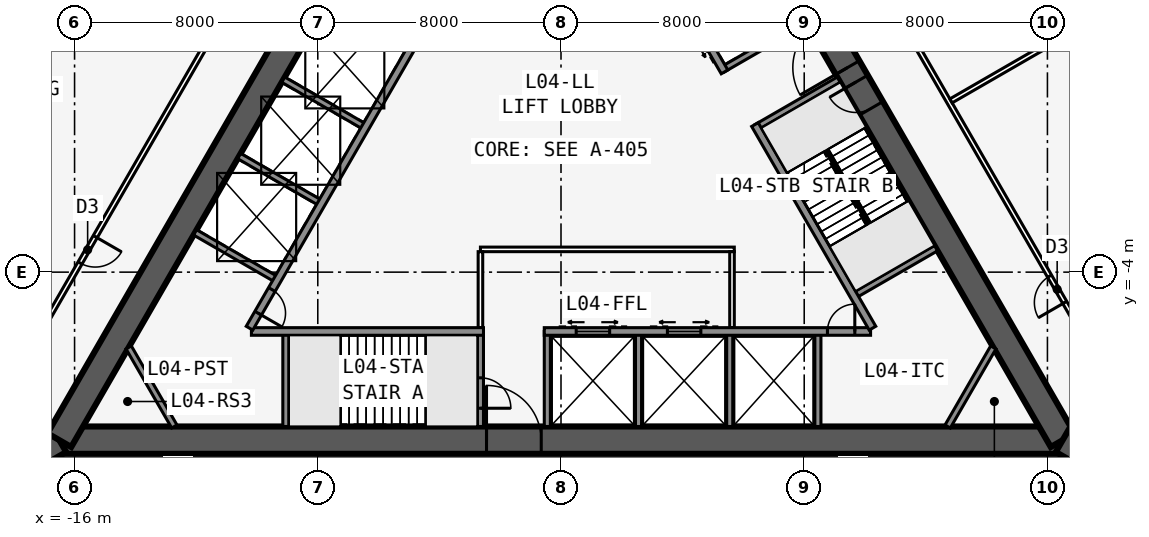
"""IFC4 building model, lengths in metres.
Left out: names, types, materials, properties, quantities, classifications, styles, units other than length and angle.
Written with IfcOpenShell. Run it as: python <this file> out.ifc"""

import sys

from ifc_helpers import new_model, si_unit, direction, frame, frame_2d, origin, place, context, subcontext, project, spatial, rectangle, extrude, element, fill, save


model = new_model("IFC4")
c1 = context("Model", 3, precision=1e-05, world=origin(), true_north=direction((0.0, 1.0)))
c2 = subcontext(c1, "Body", "Model", "MODEL_VIEW")
j1 = project(units=[si_unit("LENGTHUNIT", "METRE"), si_unit("PLANEANGLEUNIT", "RADIAN")], contexts=[c1])
p1 = place(None, origin())
s1 = spatial("IfcSite", under=j1, at=p1, CompositionType="ELEMENT")
p2 = place(p1, origin())
s2 = spatial("IfcBuilding", under=s1, at=p2, CompositionType="ELEMENT")
p3 = place(p2, frame((0.0, 0.0, 22.5)))
s3 = spatial("IfcBuildingStorey", under=s2, at=p3, CompositionType="ELEMENT", Elevation=22.5)
p4 = place(p3, frame((-16.5, -9.526, 0.0), z_axis=(0.0, 0.0, 1.0), x_axis=(1.0, 0.0, 0.0)))
e1 = element("IfcWall", 1, at=p4, inside=s3, PredefinedType="SHEAR", context=c2, shape_type="SweptSolid", body=[
    extrude(rectangle(XDim=33.0, YDim=0.9, at=frame_2d((16.5, 0.0))), origin(), (0.0, 0.0, 1.0), 6.0),
])
p5 = place(p4, frame((14.05, 0.0, 0.0)))
e2 = element("IfcOpeningElement", 2, at=p5, cuts=e1, PredefinedType="OPENING", context=c2, shape_type="SweptSolid", body=[
    extrude(rectangle(XDim=1.8, YDim=2.13, at=frame_2d((0.9, 1.065))), frame((0.0, 0.46, 0.0), z_axis=(0.0, -1.0, 0.0), x_axis=(1.0, 0.0, 0.0)), (0.0, 0.0, 1.0), 0.92),
])
p6 = place(p3, frame((-10.183, -5.951, 0.0), z_axis=(0.0, 0.0, 1.0), x_axis=(1.0, 0.0, 0.0)))
e3 = element("IfcWall", 3, at=p6, inside=s3, PredefinedType="SOLIDWALL", context=c2, shape_type="SweptSolid", body=[
    extrude(rectangle(XDim=7.633, YDim=0.25, at=frame_2d((3.816, 0.0))), origin(), (0.0, 0.0, 1.0), 5.835),
])
p7 = place(p3, frame((-0.55, -5.951, 0.0), z_axis=(0.0, 0.0, 1.0), x_axis=(1.0, 0.0, 0.0)))
e4 = element("IfcWall", 4, at=p7, inside=s3, PredefinedType="SOLIDWALL", context=c2, shape_type="SweptSolid", body=[
    extrude(rectangle(XDim=10.733, YDim=0.25, at=frame_2d((5.366, 0.0))), origin(), (0.0, 0.0, 1.0), 5.835),
])
p8 = place(p7, frame((9.314, 0.0, 0.0)))
e5 = element("IfcOpeningElement", 5, at=p8, cuts=e4, PredefinedType="OPENING", context=c2, shape_type="SweptSolid", body=[
    extrude(rectangle(XDim=0.9, YDim=2.13, at=frame_2d((0.45, 1.065))), frame((0.0, 0.135, 0.0), z_axis=(0.0, -1.0, 0.0), x_axis=(1.0, 0.0, 0.0)), (0.0, 0.0, 1.0), 0.27),
])
p9 = place(p7, frame((1.05, 0.0, 0.0)))
e6 = element("IfcOpeningElement", 6, at=p9, cuts=e4, PredefinedType="OPENING", context=c2, shape_type="SweptSolid", body=[
    extrude(rectangle(XDim=1.1, YDim=2.13, at=frame_2d((0.55, 1.065))), frame((0.0, 0.135, 0.0), z_axis=(0.0, -1.0, 0.0), x_axis=(1.0, 0.0, 0.0)), (0.0, 0.0, 1.0), 0.27),
])
p10 = place(p7, frame((4.05, 0.0, 0.0)))
e7 = element("IfcOpeningElement", 7, at=p10, cuts=e4, PredefinedType="OPENING", context=c2, shape_type="SweptSolid", body=[
    extrude(rectangle(XDim=1.1, YDim=2.13, at=frame_2d((0.55, 1.065))), frame((0.0, 0.135, 0.0), z_axis=(0.0, -1.0, 0.0), x_axis=(1.0, 0.0, 0.0)), (0.0, 0.0, 1.0), 0.27),
])
p11 = place(p3, frame((-9.05, -5.951, 0.0), z_axis=(0.0, 0.0, 1.0), x_axis=(0.0, -1.0, 0.0)))
e8 = element("IfcWall", 8, at=p11, inside=s3, PredefinedType="SOLIDWALL", context=c2, shape_type="SweptSolid", body=[
    extrude(rectangle(XDim=3.125, YDim=0.2, at=frame_2d((1.562, 0.0))), origin(), (0.0, 0.0, 1.0), 5.835),
])
p12 = place(p3, frame((-2.65, -5.951, 0.0), z_axis=(0.0, 0.0, 1.0), x_axis=(0.0, -1.0, 0.0)))
e9 = element("IfcWall", 9, at=p12, inside=s3, PredefinedType="SOLIDWALL", context=c2, shape_type="SweptSolid", body=[
    extrude(rectangle(XDim=3.125, YDim=0.2, at=frame_2d((1.562, 0.0))), origin(), (0.0, 0.0, 1.0), 5.835),
])
p13 = place(p12, frame((1.525, 0.0, 0.0)))
e10 = element("IfcOpeningElement", 10, at=p13, cuts=e9, PredefinedType="OPENING", context=c2, shape_type="SweptSolid", body=[
    extrude(rectangle(XDim=1.0, YDim=2.13, at=frame_2d((0.5, 1.065))), frame((0.0, 0.11, 0.0), z_axis=(0.0, -1.0, 0.0), x_axis=(1.0, 0.0, 0.0)), (0.0, 0.0, 1.0), 0.22),
])
for number, where, z_axis, x_axis in (
    (11, (-0.45, -5.951, 0.0), (0.0, 0.0, 1.0), (0.0, -1.0, 0.0)),
    (12, (2.55, -5.951, 0.0), (0.0, 0.0, 1.0), (0.0, -1.0, 0.0)),
    (13, (5.55, -5.951, 0.0), (0.0, 0.0, 1.0), (0.0, -1.0, 0.0)),
    (14, (8.45, -5.951, 0.0), (0.0, 0.0, 1.0), (0.0, -1.0, 0.0)),
):
    element("IfcWall", number, at=place(p3, frame(where, z_axis=z_axis, x_axis=x_axis)), inside=s3, PredefinedType="SOLIDWALL", context=c2, shape_type="SweptSolid", body=[
        extrude(rectangle(XDim=3.125, YDim=0.2, at=frame_2d((1.562, 0.0))), origin(), (0.0, 0.0, 1.0), 5.835),
    ])
p14 = place(p3, frame((16.5, -9.526, 0.0), z_axis=(0.0, 0.0, 1.0), x_axis=(-0.499999749417, 0.866025548458, 0.0)))
e15 = element("IfcWall", 15, at=p14, inside=s3, PredefinedType="SHEAR", context=c2, shape_type="SweptSolid", body=[
    extrude(rectangle(XDim=33.0, YDim=0.9, at=frame_2d((16.5, 0.0))), origin(), (0.0, 0.0, 1.0), 6.0),
])
p15 = place(p14, frame((14.15, 0.0, 0.0)))
e16 = element("IfcOpeningElement", 16, at=p15, cuts=e15, PredefinedType="OPENING", context=c2, shape_type="SweptSolid", body=[
    extrude(rectangle(XDim=1.8, YDim=2.13, at=frame_2d((0.9, 1.065))), frame((0.0, 0.46, 0.0), z_axis=(0.0, -1.0, 0.0), x_axis=(1.0, 0.0, 0.0)), (0.0, 0.0, 1.0), 0.92),
])
p16 = place(p14, frame((12.6, 0.0, 0.0)))
e17 = element("IfcOpeningElement", 17, at=p16, cuts=e15, PredefinedType="OPENING", context=c2, shape_type="SweptSolid", body=[
    extrude(rectangle(XDim=1.0, YDim=2.13, at=frame_2d((0.5, 1.065))), frame((0.0, 0.46, 0.0), z_axis=(0.0, -1.0, 0.0), x_axis=(1.0, 0.0, 0.0)), (0.0, 0.0, 1.0), 0.92),
])
p17 = place(p3, frame((10.245, -5.843, 0.0), z_axis=(0.0, 0.0, 1.0), x_axis=(-0.499993009313, 0.866029439822, 0.0)))
e18 = element("IfcWall", 18, at=p17, inside=s3, PredefinedType="SOLIDWALL", context=c2, shape_type="SweptSolid", body=[
    extrude(rectangle(XDim=7.733, YDim=0.25, at=frame_2d((3.866, 0.0))), origin(), (0.0, 0.0, 1.0), 5.835),
])
p18 = place(p3, frame((5.379, 2.586, 0.0), z_axis=(0.0, 0.0, 1.0), x_axis=(-0.500001375892, 0.866024609411, 0.0)))
e19 = element("IfcWall", 19, at=p18, inside=s3, PredefinedType="SOLIDWALL", context=c2, shape_type="SweptSolid", body=[
    extrude(rectangle(XDim=10.633, YDim=0.25, at=frame_2d((5.316, 0.0))), origin(), (0.0, 0.0, 1.0), 5.835),
])
p19 = place(p18, frame((9.164, 0.0, 0.0)))
e20 = element("IfcOpeningElement", 20, at=p19, cuts=e19, PredefinedType="OPENING", context=c2, shape_type="SweptSolid", body=[
    extrude(rectangle(XDim=0.9, YDim=2.13, at=frame_2d((0.45, 1.065))), frame((0.0, 0.135, 0.0), z_axis=(0.0, -1.0, 0.0), x_axis=(1.0, 0.0, 0.0)), (0.0, 0.0, 1.0), 0.27),
])
p20 = place(p18, frame((1.0, 0.0, 0.0)))
e21 = element("IfcOpeningElement", 21, at=p20, cuts=e19, PredefinedType="OPENING", context=c2, shape_type="SweptSolid", body=[
    extrude(rectangle(XDim=1.1, YDim=2.13, at=frame_2d((0.55, 1.065))), frame((0.0, 0.135, 0.0), z_axis=(0.0, -1.0, 0.0), x_axis=(1.0, 0.0, 0.0)), (0.0, 0.0, 1.0), 0.27),
])
p21 = place(p18, frame((3.9, 0.0, 0.0)))
e22 = element("IfcOpeningElement", 22, at=p21, cuts=e19, PredefinedType="OPENING", context=c2, shape_type="SweptSolid", body=[
    extrude(rectangle(XDim=1.1, YDim=2.13, at=frame_2d((0.55, 1.065))), frame((0.0, 0.135, 0.0), z_axis=(0.0, -1.0, 0.0), x_axis=(1.0, 0.0, 0.0)), (0.0, 0.0, 1.0), 0.27),
])
p22 = place(p18, frame((6.8, 0.0, 0.0)))
e23 = element("IfcOpeningElement", 23, at=p22, cuts=e19, PredefinedType="OPENING", context=c2, shape_type="SweptSolid", body=[
    extrude(rectangle(XDim=1.1, YDim=2.13, at=frame_2d((0.55, 1.065))), frame((0.0, 0.135, 0.0), z_axis=(0.0, -1.0, 0.0), x_axis=(1.0, 0.0, 0.0)), (0.0, 0.0, 1.0), 0.27),
])
for number, where, z_axis, x_axis in (
    (24, (9.629, -4.775, 0.0), (0.0, 0.0, 1.0), (0.866, 0.5, 0.0)),
    (25, (6.429, 0.767, 0.0), (0.0, 0.0, 1.0), (0.866, 0.5, 0.0)),
    (26, (5.329, 2.673, 0.0), (0.0, 0.0, 1.0), (0.866, 0.5, 0.0)),
):
    element("IfcWall", number, at=place(p3, frame(where, z_axis=z_axis, x_axis=x_axis)), inside=s3, PredefinedType="SOLIDWALL", context=c2, shape_type="SweptSolid", body=[
        extrude(rectangle(XDim=3.125, YDim=0.2, at=frame_2d((1.562, 0.0))), origin(), (0.0, 0.0, 1.0), 5.835),
    ])
p23 = place(p3, frame((0.0, 19.052, 0.0), z_axis=(0.0, 0.0, 1.0), x_axis=(-0.499999749417, -0.866025548458, 0.0)))
e27 = element("IfcWall", 27, at=p23, inside=s3, PredefinedType="SHEAR", context=c2, shape_type="SweptSolid", body=[
    extrude(rectangle(XDim=33.0, YDim=0.9, at=frame_2d((16.5, 0.0))), origin(), (0.0, 0.0, 1.0), 6.0),
])
p24 = place(p23, frame((14.15, 0.0, 0.0)))
e28 = element("IfcOpeningElement", 28, at=p24, cuts=e27, PredefinedType="OPENING", context=c2, shape_type="SweptSolid", body=[
    extrude(rectangle(XDim=1.8, YDim=2.13, at=frame_2d((0.9, 1.065))), frame((0.0, 0.46, 0.0), z_axis=(0.0, -1.0, 0.0), x_axis=(1.0, 0.0, 0.0)), (0.0, 0.0, 1.0), 0.92),
])
p25 = place(p23, frame((12.6, 0.0, 0.0)))
e29 = element("IfcOpeningElement", 29, at=p25, cuts=e27, PredefinedType="OPENING", context=c2, shape_type="SweptSolid", body=[
    extrude(rectangle(XDim=1.0, YDim=2.13, at=frame_2d((0.5, 1.065))), frame((0.0, 0.46, 0.0), z_axis=(0.0, -1.0, 0.0), x_axis=(1.0, 0.0, 0.0)), (0.0, 0.0, 1.0), 0.92),
])
p26 = place(p3, frame((-4.929, 3.365, 0.0), z_axis=(0.0, 0.0, 1.0), x_axis=(-0.499991433582, -0.866030349552, 0.0)))
e30 = element("IfcWall", 30, at=p26, inside=s3, PredefinedType="SOLIDWALL", context=c2, shape_type="SweptSolid", body=[
    extrude(rectangle(XDim=10.633, YDim=0.25, at=frame_2d((5.316, 0.0))), origin(), (0.0, 0.0, 1.0), 5.835),
])
p27 = place(p26, frame((9.164, 0.0, 0.0)))
e31 = element("IfcOpeningElement", 31, at=p27, cuts=e30, PredefinedType="OPENING", context=c2, shape_type="SweptSolid", body=[
    extrude(rectangle(XDim=0.9, YDim=2.13, at=frame_2d((0.45, 1.065))), frame((0.0, 0.135, 0.0), z_axis=(0.0, -1.0, 0.0), x_axis=(1.0, 0.0, 0.0)), (0.0, 0.0, 1.0), 0.27),
])
for number, where, z_axis, x_axis in (
    (32, (-4.979, 3.279, 0.0), (0.0, 0.0, 1.0), (-0.866, 0.5, 0.0)),
    (33, (-6.429, 0.767, 0.0), (0.0, 0.0, 1.0), (-0.866, 0.5, 0.0)),
    (34, (-7.879, -1.744, 0.0), (0.0, 0.0, 1.0), (-0.866, 0.5, 0.0)),
    (35, (-9.329, -4.256, 0.0), (0.0, 0.0, 1.0), (-0.866, 0.5, 0.0)),
):
    element("IfcWall", number, at=place(p3, frame(where, z_axis=z_axis, x_axis=x_axis)), inside=s3, PredefinedType="SOLIDWALL", context=c2, shape_type="SweptSolid", body=[
        extrude(rectangle(XDim=3.125, YDim=0.2, at=frame_2d((1.562, 0.0))), origin(), (0.0, 0.0, 1.0), 5.835),
    ])
p28 = place(p3, frame((16.5, -9.526, 0.0), z_axis=(0.0, 0.0, 1.0), x_axis=(0.866031398331, -0.499989616998, 0.0)))
e36 = element("IfcWall", 36, at=p28, inside=s3, PredefinedType="SHEAR", context=c2, shape_type="SweptSolid", body=[
    extrude(rectangle(XDim=4.746, YDim=0.9, at=frame_2d((2.373, 0.0))), origin(), (0.0, 0.0, 1.0), 6.0),
])
p29 = place(p28, frame((1.8, 0.0, 0.0)))
e37 = element("IfcOpeningElement", 37, at=p29, cuts=e36, PredefinedType="OPENING", context=c2, shape_type="SweptSolid", body=[
    extrude(rectangle(XDim=1.8, YDim=2.13, at=frame_2d((0.9, 1.065))), frame((0.0, 0.46, 0.0), z_axis=(0.0, -1.0, 0.0), x_axis=(1.0, 0.0, 0.0)), (0.0, 0.0, 1.0), 0.92),
])
p30 = place(p3, frame((-16.5, -9.526, 0.0), z_axis=(0.0, 0.0, 1.0), x_axis=(-0.866031398331, -0.499989616998, 0.0)))
e38 = element("IfcWall", 38, at=p30, inside=s3, PredefinedType="SHEAR", context=c2, shape_type="SweptSolid", body=[
    extrude(rectangle(XDim=4.746, YDim=0.9, at=frame_2d((2.373, 0.0))), origin(), (0.0, 0.0, 1.0), 6.0),
])
p31 = place(p30, frame((1.8, 0.0, 0.0)))
e39 = element("IfcOpeningElement", 39, at=p31, cuts=e38, PredefinedType="OPENING", context=c2, shape_type="SweptSolid", body=[
    extrude(rectangle(XDim=1.8, YDim=2.13, at=frame_2d((0.9, 1.065))), frame((0.0, 0.46, 0.0), z_axis=(0.0, -1.0, 0.0), x_axis=(1.0, 0.0, 0.0)), (0.0, 0.0, 1.0), 0.92),
])
p32 = place(p3, frame((20.027, -10.985, 0.0), z_axis=(0.0, 0.0, 1.0), x_axis=(-0.500001677587, 0.866024435227, 0.0)))
e40 = element("IfcWall", 40, at=p32, inside=s3, PredefinedType="PARTITIONING", context=c2, shape_type="SweptSolid", body=[
    extrude(rectangle(XDim=39.054, YDim=0.15, at=frame_2d((19.527, 0.0))), origin(), (0.0, 0.0, 1.0), 5.835),
])
p33 = place(p32, frame((6.914, 0.0, 0.0)))
e41 = element("IfcOpeningElement", 41, at=p33, cuts=e40, PredefinedType="OPENING", context=c2, shape_type="SweptSolid", body=[
    extrude(rectangle(XDim=1.0, YDim=2.13, at=frame_2d((0.5, 1.065))), frame((0.0, 0.085, 0.0), z_axis=(0.0, -1.0, 0.0), x_axis=(1.0, 0.0, 0.0)), (0.0, 0.0, 1.0), 0.17),
])
p34 = place(p32, frame((18.527, 0.0, 0.0)))
e42 = element("IfcOpeningElement", 42, at=p34, cuts=e40, PredefinedType="OPENING", context=c2, shape_type="SweptSolid", body=[
    extrude(rectangle(XDim=1.0, YDim=2.13, at=frame_2d((0.5, 1.065))), frame((0.0, 0.085, 0.0), z_axis=(0.0, -1.0, 0.0), x_axis=(1.0, 0.0, 0.0)), (0.0, 0.0, 1.0), 0.17),
])
p35 = place(p32, frame((30.64, 0.0, 0.0)))
e43 = element("IfcOpeningElement", 43, at=p35, cuts=e40, PredefinedType="OPENING", context=c2, shape_type="SweptSolid", body=[
    extrude(rectangle(XDim=1.0, YDim=2.13, at=frame_2d((0.5, 1.065))), frame((0.0, 0.085, 0.0), z_axis=(0.0, -1.0, 0.0), x_axis=(1.0, 0.0, 0.0)), (0.0, 0.0, 1.0), 0.17),
])
p36 = place(p3, frame((12.829, 1.633, 0.0), z_axis=(0.0, 0.0, 1.0), x_axis=(0.866026934769, 0.499997348248, 0.0)))
e44 = element("IfcWall", 44, at=p36, inside=s3, PredefinedType="PARTITIONING", context=c2, shape_type="SweptSolid", body=[
    extrude(rectangle(XDim=9.943, YDim=0.15, at=frame_2d((4.971, 0.0))), origin(), (0.0, 0.0, 1.0), 4.794),
])
p37 = place(p3, frame((-0.5, 22.836, 0.0), z_axis=(0.0, 0.0, 1.0), x_axis=(-0.500001677587, -0.866024435227, 0.0)))
e45 = element("IfcWall", 45, at=p37, inside=s3, PredefinedType="PARTITIONING", context=c2, shape_type="SweptSolid", body=[
    extrude(rectangle(XDim=39.054, YDim=0.15, at=frame_2d((19.527, 0.0))), origin(), (0.0, 0.0, 1.0), 5.835),
])
p38 = place(p37, frame((5.914, 0.0, 0.0)))
e46 = element("IfcOpeningElement", 46, at=p38, cuts=e45, PredefinedType="OPENING", context=c2, shape_type="SweptSolid", body=[
    extrude(rectangle(XDim=1.0, YDim=2.13, at=frame_2d((0.5, 1.065))), frame((0.0, 0.085, 0.0), z_axis=(0.0, -1.0, 0.0), x_axis=(1.0, 0.0, 0.0)), (0.0, 0.0, 1.0), 0.17),
])
p39 = place(p37, frame((16.527, 0.0, 0.0)))
e47 = element("IfcOpeningElement", 47, at=p39, cuts=e45, PredefinedType="OPENING", context=c2, shape_type="SweptSolid", body=[
    extrude(rectangle(XDim=1.0, YDim=2.13, at=frame_2d((0.5, 1.065))), frame((0.0, 0.085, 0.0), z_axis=(0.0, -1.0, 0.0), x_axis=(1.0, 0.0, 0.0)), (0.0, 0.0, 1.0), 0.17),
])
p40 = place(p37, frame((29.64, 0.0, 0.0)))
e48 = element("IfcOpeningElement", 48, at=p40, cuts=e45, PredefinedType="OPENING", context=c2, shape_type="SweptSolid", body=[
    extrude(rectangle(XDim=1.0, YDim=2.13, at=frame_2d((0.5, 1.065))), frame((0.0, 0.085, 0.0), z_axis=(0.0, -1.0, 0.0), x_axis=(1.0, 0.0, 0.0)), (0.0, 0.0, 1.0), 0.17),
])
p41 = place(p3, frame((-2.65, -3.251, 0.0), z_axis=(0.0, 0.0, 1.0), x_axis=(1.0, 0.0, 0.0)))
e49 = element("IfcWall", 49, at=p41, inside=s3, PredefinedType="PARTITIONING", context=c2, shape_type="SweptSolid", body=[
    extrude(rectangle(XDim=8.35, YDim=0.15, at=frame_2d((4.175, 0.0))), origin(), (0.0, 0.0, 1.0), 5.835),
])
for number, where, z_axis, x_axis in (
    (50, (-2.65, -5.826, 0.0), (0.0, 0.0, 1.0), (0.0, 1.0, 0.0)),
    (51, (5.625, -5.826, 0.0), (0.0, 0.0, 1.0), (0.0, 1.0, 0.0)),
):
    element("IfcWall", number, at=place(p3, frame(where, z_axis=z_axis, x_axis=x_axis)), inside=s3, PredefinedType="PARTITIONING", context=c2, shape_type="SweptSolid", body=[
        extrude(rectangle(XDim=2.5, YDim=0.15, at=frame_2d((1.25, 0.0))), origin(), (0.0, 0.0, 1.0), 5.835),
    ])
for number, where, z_axis, x_axis in (
    (52, (14.219, -6.476, 0.0), (0.0, 0.0, 1.0), (-0.5, -0.866, 0.0)),
    (53, (-12.719, -9.076, 0.0), (0.0, 0.0, 1.0), (-0.5, 0.866, 0.0)),
):
    element("IfcWall", number, at=place(p3, frame(where, z_axis=z_axis, x_axis=x_axis)), inside=s3, PredefinedType="SOLIDWALL", context=c2, shape_type="SweptSolid", body=[
        extrude(rectangle(XDim=3.002, YDim=0.2, at=frame_2d((1.501, 0.0))), origin(), (0.0, 0.0, 1.0), 5.835),
    ])
p42 = place(p3, frame((-7.247, -7.576, 0.0), z_axis=(0.0, 0.0, 1.0), x_axis=(1.0, 0.0, 0.0)))
e54 = element("IfcWall", 54, at=p42, inside=s3, PredefinedType="SOLIDWALL", context=c2, shape_type="SweptSolid", body=[
    extrude(rectangle(XDim=2.794, YDim=0.1, at=frame_2d((1.397, 0.0))), origin(), (0.0, 0.0, 1.0), 6.0),
])
p43 = place(p3, frame((10.135, -2.401, 0.0), z_axis=(0.0, 0.0, 1.0), x_axis=(-0.499992232847, 0.866029888106, 0.0)))
e55 = element("IfcWall", 55, at=p43, inside=s3, PredefinedType="SOLIDWALL", context=c2, shape_type="SweptSolid", body=[
    extrude(rectangle(XDim=2.794, YDim=0.1, at=frame_2d((1.397, 0.0))), origin(), (0.0, 0.0, 1.0), 6.0),
])
p44 = place(p33, origin())
e56 = element("IfcDoor", 56, at=p44, inside=s3, OperationType="SINGLE_SWING_LEFT", PredefinedType="DOOR", context=c2, shape_type="SweptSolid", body=[
    extrude(rectangle(XDim=1.0, YDim=2.13, at=frame_2d((0.5, 1.065))), frame((0.0, 0.025, 0.0), z_axis=(0.0, -1.0, 0.0), x_axis=(1.0, 0.0, 0.0)), (0.0, 0.0, 1.0), 0.05),
])
fill(e41, e56)
p45 = place(p40, origin())
e57 = element("IfcDoor", 57, at=p45, inside=s3, OperationType="SINGLE_SWING_LEFT", PredefinedType="DOOR", context=c2, shape_type="SweptSolid", body=[
    extrude(rectangle(XDim=1.0, YDim=2.13, at=frame_2d((0.5, 1.065))), frame((0.0, 0.025, 0.0), z_axis=(0.0, -1.0, 0.0), x_axis=(1.0, 0.0, 0.0)), (0.0, 0.0, 1.0), 0.05),
])
fill(e48, e57)
p46 = place(p5, origin())
e58 = element("IfcDoor", 58, at=p46, inside=s3, OperationType="DOUBLE_DOOR_SINGLE_SWING", PredefinedType="DOOR", context=c2, shape_type="SweptSolid", body=[
    extrude(rectangle(XDim=1.8, YDim=2.13, at=frame_2d((0.9, 1.065))), frame((0.0, 0.025, 0.0), z_axis=(0.0, -1.0, 0.0), x_axis=(1.0, 0.0, 0.0)), (0.0, 0.0, 1.0), 0.05),
])
fill(e2, e58)
p47 = place(p13, origin())
e59 = element("IfcDoor", 59, at=p47, inside=s3, OperationType="SINGLE_SWING_RIGHT", PredefinedType="DOOR", context=c2, shape_type="SweptSolid", body=[
    extrude(rectangle(XDim=1.0, YDim=2.13, at=frame_2d((0.5, 1.065))), frame((0.0, 0.025, 0.0), z_axis=(0.0, -1.0, 0.0), x_axis=(1.0, 0.0, 0.0)), (0.0, 0.0, 1.0), 0.05),
])
fill(e10, e59)
p48 = place(p15, origin())
e60 = element("IfcDoor", 60, at=p48, inside=s3, OperationType="DOUBLE_DOOR_SINGLE_SWING", PredefinedType="DOOR", context=c2, shape_type="SweptSolid", body=[
    extrude(rectangle(XDim=1.8, YDim=2.13, at=frame_2d((0.9, 1.065))), frame((0.0, 0.025, 0.0), z_axis=(0.0, -1.0, 0.0), x_axis=(1.0, 0.0, 0.0)), (0.0, 0.0, 1.0), 0.05),
])
fill(e16, e60)
p49 = place(p16, origin())
e61 = element("IfcDoor", 61, at=p49, inside=s3, OperationType="SINGLE_SWING_RIGHT", PredefinedType="DOOR", context=c2, shape_type="SweptSolid", body=[
    extrude(rectangle(XDim=1.0, YDim=2.13, at=frame_2d((0.5, 1.065))), frame((0.0, 0.025, 0.0), z_axis=(0.0, -1.0, 0.0), x_axis=(1.0, 0.0, 0.0)), (0.0, 0.0, 1.0), 0.05),
])
fill(e17, e61)
p50 = place(p8, origin())
e62 = element("IfcDoor", 62, at=p50, inside=s3, OperationType="SINGLE_SWING_RIGHT", PredefinedType="DOOR", context=c2, shape_type="SweptSolid", body=[
    extrude(rectangle(XDim=0.9, YDim=2.13, at=frame_2d((0.45, 1.065))), frame((0.0, 0.025, 0.0), z_axis=(0.0, -1.0, 0.0), x_axis=(1.0, 0.0, 0.0)), (0.0, 0.0, 1.0), 0.05),
])
fill(e5, e62)
p51 = place(p27, origin())
e63 = element("IfcDoor", 63, at=p51, inside=s3, OperationType="SINGLE_SWING_RIGHT", PredefinedType="DOOR", context=c2, shape_type="SweptSolid", body=[
    extrude(rectangle(XDim=0.9, YDim=2.13, at=frame_2d((0.45, 1.065))), frame((0.0, 0.025, 0.0), z_axis=(0.0, -1.0, 0.0), x_axis=(1.0, 0.0, 0.0)), (0.0, 0.0, 1.0), 0.05),
])
fill(e31, e63)
p52 = place(p9, origin())
e64 = element("IfcDoor", 64, at=p52, inside=s3, OperationType="DOUBLE_DOOR_SLIDING", PredefinedType="USERDEFINED", context=c2, shape_type="SweptSolid", body=[
    extrude(rectangle(XDim=1.1, YDim=2.13, at=frame_2d((0.55, 1.065))), frame((0.0, 0.025, 0.0), z_axis=(0.0, -1.0, 0.0), x_axis=(1.0, 0.0, 0.0)), (0.0, 0.0, 1.0), 0.05),
])
fill(e6, e64)
p53 = place(p10, origin())
e65 = element("IfcDoor", 65, at=p53, inside=s3, OperationType="DOUBLE_DOOR_SLIDING", PredefinedType="USERDEFINED", context=c2, shape_type="SweptSolid", body=[
    extrude(rectangle(XDim=1.1, YDim=2.13, at=frame_2d((0.55, 1.065))), frame((0.0, 0.025, 0.0), z_axis=(0.0, -1.0, 0.0), x_axis=(1.0, 0.0, 0.0)), (0.0, 0.0, 1.0), 0.05),
])
fill(e7, e65)
save(model, sys.argv[1])
